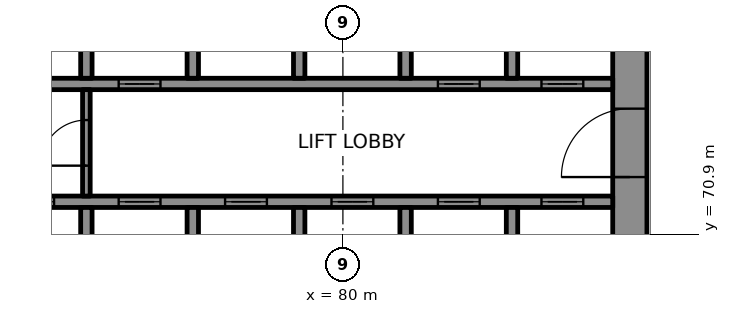
"""IFC4 building model, lengths in metres.
Left out: names, types, materials, properties, quantities, classifications, styles, units other than length and angle.
Written with IfcOpenShell. Run it as: python <this file> out.ifc"""

import sys

from ifc_helpers import new_model, si_unit, direction, frame, frame_2d, origin, place, context, subcontext, project, spatial, rectangle, extrude, element, fill, save


model = new_model("IFC4")
c1 = context("Model", 3, precision=1e-05, world=origin(), true_north=direction((0.0, 1.0)))
c2 = subcontext(c1, "Body", "Model", "MODEL_VIEW")
j1 = project(units=[si_unit("LENGTHUNIT", "METRE"), si_unit("PLANEANGLEUNIT", "RADIAN")], contexts=[c1])
p1 = place(None, origin())
s1 = spatial("IfcSite", under=j1, at=p1, CompositionType="ELEMENT")
p2 = place(p1, origin())
s2 = spatial("IfcBuilding", under=s1, at=p2, CompositionType="ELEMENT")
p3 = place(p2, frame((0.0, 0.0, 52.6)))
s3 = spatial("IfcBuildingStorey", under=s2, at=p3, CompositionType="ELEMENT", Elevation=52.6)
p4 = place(p3, frame((87.55, 66.9, 0.0), z_axis=(0.0, 0.0, 1.0), x_axis=(0.0, 1.0, 0.0)))
e1 = element("IfcWall", 1, at=p4, inside=s3, PredefinedType="SHEAR", context=c2, shape_type="SweptSolid", body=[
    extrude(rectangle(XDim=16.2, YDim=0.9, at=frame_2d((8.1, 0.0))), origin(), (0.0, 0.0, 1.0), 4.0),
])
p5 = place(p4, frame((5.5, 0.0, 0.0)))
e2 = element("IfcOpeningElement", 2, at=p5, cuts=e1, PredefinedType="OPENING", context=c2, shape_type="SweptSolid", body=[
    extrude(rectangle(XDim=1.8, YDim=2.1, at=frame_2d((0.9, 1.05))), frame((0.0, 0.46, 0.0), z_axis=(0.0, -1.0, 0.0), x_axis=(1.0, 0.0, 0.0)), (0.0, 0.0, 1.0), 0.92),
])
p6 = place(p4, frame((11.738, 0.0, 0.0)))
e3 = element("IfcOpeningElement", 3, at=p6, cuts=e1, PredefinedType="OPENING", context=c2, shape_type="SweptSolid", body=[
    extrude(rectangle(XDim=0.9, YDim=2.1, at=frame_2d((0.45, 1.05))), frame((0.0, 0.46, 0.0), z_axis=(0.0, -1.0, 0.0), x_axis=(1.0, 0.0, 0.0)), (0.0, 0.0, 1.0), 0.92),
])
p7 = place(p3, frame((70.3, 71.75, 0.0), z_axis=(0.0, 0.0, 1.0), x_axis=(1.0, 0.0, 0.0)))
e4 = element("IfcWall", 4, at=p7, inside=s3, PredefinedType="SHEAR", context=c2, shape_type="SweptSolid", body=[
    extrude(rectangle(XDim=16.8, YDim=0.3, at=frame_2d((8.4, 0.0))), origin(), (0.0, 0.0, 1.0), 4.0),
])
p8 = place(p7, frame((1.0, 0.0, 0.0)))
e5 = element("IfcOpeningElement", 5, at=p8, cuts=e4, PredefinedType="OPENING", context=c2, shape_type="SweptSolid", body=[
    extrude(rectangle(XDim=1.1, YDim=2.1, at=frame_2d((0.55, 1.05))), frame((0.0, 0.16, 0.0), z_axis=(0.0, -1.0, 0.0), x_axis=(1.0, 0.0, 0.0)), (0.0, 0.0, 1.0), 0.32),
])
p9 = place(p7, frame((3.8, 0.0, 0.0)))
e6 = element("IfcOpeningElement", 6, at=p9, cuts=e4, PredefinedType="OPENING", context=c2, shape_type="SweptSolid", body=[
    extrude(rectangle(XDim=1.1, YDim=2.1, at=frame_2d((0.55, 1.05))), frame((0.0, 0.16, 0.0), z_axis=(0.0, -1.0, 0.0), x_axis=(1.0, 0.0, 0.0)), (0.0, 0.0, 1.0), 0.32),
])
p10 = place(p7, frame((6.6, 0.0, 0.0)))
e7 = element("IfcOpeningElement", 7, at=p10, cuts=e4, PredefinedType="OPENING", context=c2, shape_type="SweptSolid", body=[
    extrude(rectangle(XDim=1.1, YDim=2.1, at=frame_2d((0.55, 1.05))), frame((0.0, 0.16, 0.0), z_axis=(0.0, -1.0, 0.0), x_axis=(1.0, 0.0, 0.0)), (0.0, 0.0, 1.0), 0.32),
])
p11 = place(p7, frame((9.4, 0.0, 0.0)))
e8 = element("IfcOpeningElement", 8, at=p11, cuts=e4, PredefinedType="OPENING", context=c2, shape_type="SweptSolid", body=[
    extrude(rectangle(XDim=1.1, YDim=2.1, at=frame_2d((0.55, 1.05))), frame((0.0, 0.16, 0.0), z_axis=(0.0, -1.0, 0.0), x_axis=(1.0, 0.0, 0.0)), (0.0, 0.0, 1.0), 0.32),
])
p12 = place(p7, frame((12.2, 0.0, 0.0)))
e9 = element("IfcOpeningElement", 9, at=p12, cuts=e4, PredefinedType="OPENING", context=c2, shape_type="SweptSolid", body=[
    extrude(rectangle(XDim=1.1, YDim=2.1, at=frame_2d((0.55, 1.05))), frame((0.0, 0.16, 0.0), z_axis=(0.0, -1.0, 0.0), x_axis=(1.0, 0.0, 0.0)), (0.0, 0.0, 1.0), 0.32),
])
p13 = place(p7, frame((14.925, 0.0, 0.0)))
e10 = element("IfcOpeningElement", 10, at=p13, cuts=e4, PredefinedType="OPENING", context=c2, shape_type="SweptSolid", body=[
    extrude(rectangle(XDim=1.1, YDim=2.1, at=frame_2d((0.55, 1.05))), frame((0.0, 0.16, 0.0), z_axis=(0.0, -1.0, 0.0), x_axis=(1.0, 0.0, 0.0)), (0.0, 0.0, 1.0), 0.32),
])
p14 = place(p3, frame((70.3, 74.85, 0.0), z_axis=(0.0, 0.0, 1.0), x_axis=(1.0, 0.0, 0.0)))
e11 = element("IfcWall", 11, at=p14, inside=s3, PredefinedType="SHEAR", context=c2, shape_type="SweptSolid", body=[
    extrude(rectangle(XDim=16.8, YDim=0.3, at=frame_2d((8.4, 0.0))), origin(), (0.0, 0.0, 1.0), 4.0),
])
p15 = place(p14, frame((3.8, 0.0, 0.0)))
e12 = element("IfcOpeningElement", 12, at=p15, cuts=e11, PredefinedType="OPENING", context=c2, shape_type="SweptSolid", body=[
    extrude(rectangle(XDim=1.1, YDim=2.1, at=frame_2d((0.55, 1.05))), frame((0.0, 0.16, 0.0), z_axis=(0.0, -1.0, 0.0), x_axis=(1.0, 0.0, 0.0)), (0.0, 0.0, 1.0), 0.32),
])
p16 = place(p14, frame((12.2, 0.0, 0.0)))
e13 = element("IfcOpeningElement", 13, at=p16, cuts=e11, PredefinedType="OPENING", context=c2, shape_type="SweptSolid", body=[
    extrude(rectangle(XDim=1.1, YDim=2.1, at=frame_2d((0.55, 1.05))), frame((0.0, 0.16, 0.0), z_axis=(0.0, -1.0, 0.0), x_axis=(1.0, 0.0, 0.0)), (0.0, 0.0, 1.0), 0.32),
])
p17 = place(p14, frame((14.925, 0.0, 0.0)))
e14 = element("IfcOpeningElement", 14, at=p17, cuts=e11, PredefinedType="OPENING", context=c2, shape_type="SweptSolid", body=[
    extrude(rectangle(XDim=1.1, YDim=2.1, at=frame_2d((0.55, 1.05))), frame((0.0, 0.16, 0.0), z_axis=(0.0, -1.0, 0.0), x_axis=(1.0, 0.0, 0.0)), (0.0, 0.0, 1.0), 0.32),
])
for number, where, z_axis, x_axis in (
    (15, (73.25, 69.0, 0.0), (0.0, 0.0, 1.0), (0.0, 1.0, 0.0)),
    (16, (73.25, 75.0, 0.0), (0.0, 0.0, 1.0), (0.0, 1.0, 0.0)),
    (17, (76.05, 69.0, 0.0), (0.0, 0.0, 1.0), (0.0, 1.0, 0.0)),
    (18, (76.05, 75.0, 0.0), (0.0, 0.0, 1.0), (0.0, 1.0, 0.0)),
    (19, (78.85, 69.0, 0.0), (0.0, 0.0, 1.0), (0.0, 1.0, 0.0)),
    (20, (78.85, 75.0, 0.0), (0.0, 0.0, 1.0), (0.0, 1.0, 0.0)),
    (21, (81.65, 69.0, 0.0), (0.0, 0.0, 1.0), (0.0, 1.0, 0.0)),
    (22, (81.65, 75.0, 0.0), (0.0, 0.0, 1.0), (0.0, 1.0, 0.0)),
    (23, (84.45, 69.0, 0.0), (0.0, 0.0, 1.0), (0.0, 1.0, 0.0)),
    (24, (84.45, 75.0, 0.0), (0.0, 0.0, 1.0), (0.0, 1.0, 0.0)),
):
    element("IfcWall", number, at=place(p3, frame(where, z_axis=z_axis, x_axis=x_axis)), inside=s3, PredefinedType="SHEAR", context=c2, shape_type="SweptSolid", body=[
        extrude(rectangle(XDim=2.6, YDim=0.3, at=frame_2d((1.3, 0.0))), origin(), (0.0, 0.0, 1.0), 4.0),
    ])
p18 = place(p3, frame((110.994, 61.012, 0.0), z_axis=(0.0, 0.0, 1.0), x_axis=(-0.500000853759, 0.866024910866, 0.0)))
e25 = element("IfcWall", 25, at=p18, inside=s3, PredefinedType="SOLIDWALL", context=c2, shape_type="SweptSolid", body=[
    extrude(rectangle(XDim=60.222, YDim=0.8, at=frame_2d((30.111, 0.0))), origin(), (0.0, 0.0, 1.0), 0.9),
])
p19 = place(p3, frame((73.25, 71.9, 0.0), z_axis=(0.0, 0.0, 1.0), x_axis=(0.0, 1.0, 0.0)))
e26 = element("IfcWall", 26, at=p19, inside=s3, PredefinedType="PARTITIONING", context=c2, shape_type="SweptSolid", body=[
    extrude(rectangle(XDim=2.8, YDim=0.2, at=frame_2d((1.4, 0.0))), origin(), (0.0, 0.0, 1.0), 4.0),
])
p20 = place(p19, frame((0.8, 0.0, 0.0)))
e27 = element("IfcOpeningElement", 27, at=p20, cuts=e26, PredefinedType="OPENING", context=c2, shape_type="SweptSolid", body=[
    extrude(rectangle(XDim=1.2, YDim=2.1, at=frame_2d((0.6, 1.05))), frame((0.0, 0.11, 0.0), z_axis=(0.0, -1.0, 0.0), x_axis=(1.0, 0.0, 0.0)), (0.0, 0.0, 1.0), 0.22),
])
p21 = place(p8, origin())
e28 = element("IfcDoor", 28, at=p21, inside=s3, OperationType="DOUBLE_DOOR_SLIDING", PredefinedType="DOOR", context=c2, shape_type="SweptSolid", body=[
    extrude(rectangle(XDim=1.1, YDim=2.1, at=frame_2d((0.55, 1.05))), frame((0.0, 0.025, 0.0), z_axis=(0.0, -1.0, 0.0), x_axis=(1.0, 0.0, 0.0)), (0.0, 0.0, 1.0), 0.05),
])
fill(e5, e28)
p22 = place(p9, origin())
e29 = element("IfcDoor", 29, at=p22, inside=s3, OperationType="DOUBLE_DOOR_SLIDING", PredefinedType="DOOR", context=c2, shape_type="SweptSolid", body=[
    extrude(rectangle(XDim=1.1, YDim=2.1, at=frame_2d((0.55, 1.05))), frame((0.0, 0.025, 0.0), z_axis=(0.0, -1.0, 0.0), x_axis=(1.0, 0.0, 0.0)), (0.0, 0.0, 1.0), 0.05),
])
fill(e6, e29)
p23 = place(p10, origin())
e30 = element("IfcDoor", 30, at=p23, inside=s3, OperationType="DOUBLE_DOOR_SLIDING", PredefinedType="DOOR", context=c2, shape_type="SweptSolid", body=[
    extrude(rectangle(XDim=1.1, YDim=2.1, at=frame_2d((0.55, 1.05))), frame((0.0, 0.025, 0.0), z_axis=(0.0, -1.0, 0.0), x_axis=(1.0, 0.0, 0.0)), (0.0, 0.0, 1.0), 0.05),
])
fill(e7, e30)
p24 = place(p11, origin())
e31 = element("IfcDoor", 31, at=p24, inside=s3, OperationType="DOUBLE_DOOR_SLIDING", PredefinedType="DOOR", context=c2, shape_type="SweptSolid", body=[
    extrude(rectangle(XDim=1.1, YDim=2.1, at=frame_2d((0.55, 1.05))), frame((0.0, 0.025, 0.0), z_axis=(0.0, -1.0, 0.0), x_axis=(1.0, 0.0, 0.0)), (0.0, 0.0, 1.0), 0.05),
])
fill(e8, e31)
p25 = place(p12, origin())
e32 = element("IfcDoor", 32, at=p25, inside=s3, OperationType="DOUBLE_DOOR_SLIDING", PredefinedType="DOOR", context=c2, shape_type="SweptSolid", body=[
    extrude(rectangle(XDim=1.1, YDim=2.1, at=frame_2d((0.55, 1.05))), frame((0.0, 0.025, 0.0), z_axis=(0.0, -1.0, 0.0), x_axis=(1.0, 0.0, 0.0)), (0.0, 0.0, 1.0), 0.05),
])
fill(e9, e32)
p26 = place(p13, origin())
e33 = element("IfcDoor", 33, at=p26, inside=s3, OperationType="DOUBLE_DOOR_SLIDING", PredefinedType="DOOR", context=c2, shape_type="SweptSolid", body=[
    extrude(rectangle(XDim=1.1, YDim=2.1, at=frame_2d((0.55, 1.05))), frame((0.0, 0.025, 0.0), z_axis=(0.0, -1.0, 0.0), x_axis=(1.0, 0.0, 0.0)), (0.0, 0.0, 1.0), 0.05),
])
fill(e10, e33)
p27 = place(p15, origin())
e34 = element("IfcDoor", 34, at=p27, inside=s3, OperationType="DOUBLE_DOOR_SLIDING", PredefinedType="DOOR", context=c2, shape_type="SweptSolid", body=[
    extrude(rectangle(XDim=1.1, YDim=2.1, at=frame_2d((0.55, 1.05))), frame((0.0, 0.025, 0.0), z_axis=(0.0, -1.0, 0.0), x_axis=(1.0, 0.0, 0.0)), (0.0, 0.0, 1.0), 0.05),
])
fill(e12, e34)
p28 = place(p16, origin())
e35 = element("IfcDoor", 35, at=p28, inside=s3, OperationType="DOUBLE_DOOR_SLIDING", PredefinedType="DOOR", context=c2, shape_type="SweptSolid", body=[
    extrude(rectangle(XDim=1.1, YDim=2.1, at=frame_2d((0.55, 1.05))), frame((0.0, 0.025, 0.0), z_axis=(0.0, -1.0, 0.0), x_axis=(1.0, 0.0, 0.0)), (0.0, 0.0, 1.0), 0.05),
])
fill(e13, e35)
p29 = place(p17, origin())
e36 = element("IfcDoor", 36, at=p29, inside=s3, OperationType="DOUBLE_DOOR_SLIDING", PredefinedType="DOOR", context=c2, shape_type="SweptSolid", body=[
    extrude(rectangle(XDim=1.1, YDim=2.1, at=frame_2d((0.55, 1.05))), frame((0.0, 0.025, 0.0), z_axis=(0.0, -1.0, 0.0), x_axis=(1.0, 0.0, 0.0)), (0.0, 0.0, 1.0), 0.05),
])
fill(e14, e36)
p30 = place(p20, origin())
e37 = element("IfcDoor", 37, at=p30, inside=s3, OperationType="SINGLE_SWING_LEFT", PredefinedType="DOOR", context=c2, shape_type="SweptSolid", body=[
    extrude(rectangle(XDim=1.2, YDim=2.1, at=frame_2d((0.6, 1.05))), frame((0.0, 0.025, 0.0), z_axis=(0.0, -1.0, 0.0), x_axis=(1.0, 0.0, 0.0)), (0.0, 0.0, 1.0), 0.05),
])
fill(e27, e37)
p31 = place(p5, origin())
e38 = element("IfcDoor", 38, at=p31, inside=s3, OperationType="SINGLE_SWING_RIGHT", PredefinedType="DOOR", context=c2, shape_type="SweptSolid", body=[
    extrude(rectangle(XDim=1.8, YDim=2.1, at=frame_2d((0.9, 1.05))), frame((0.0, 0.17, 0.0), z_axis=(0.0, -1.0, 0.0), x_axis=(1.0, 0.0, 0.0)), (0.0, 0.0, 1.0), 0.34),
])
fill(e2, e38)
save(model, sys.argv[1])
